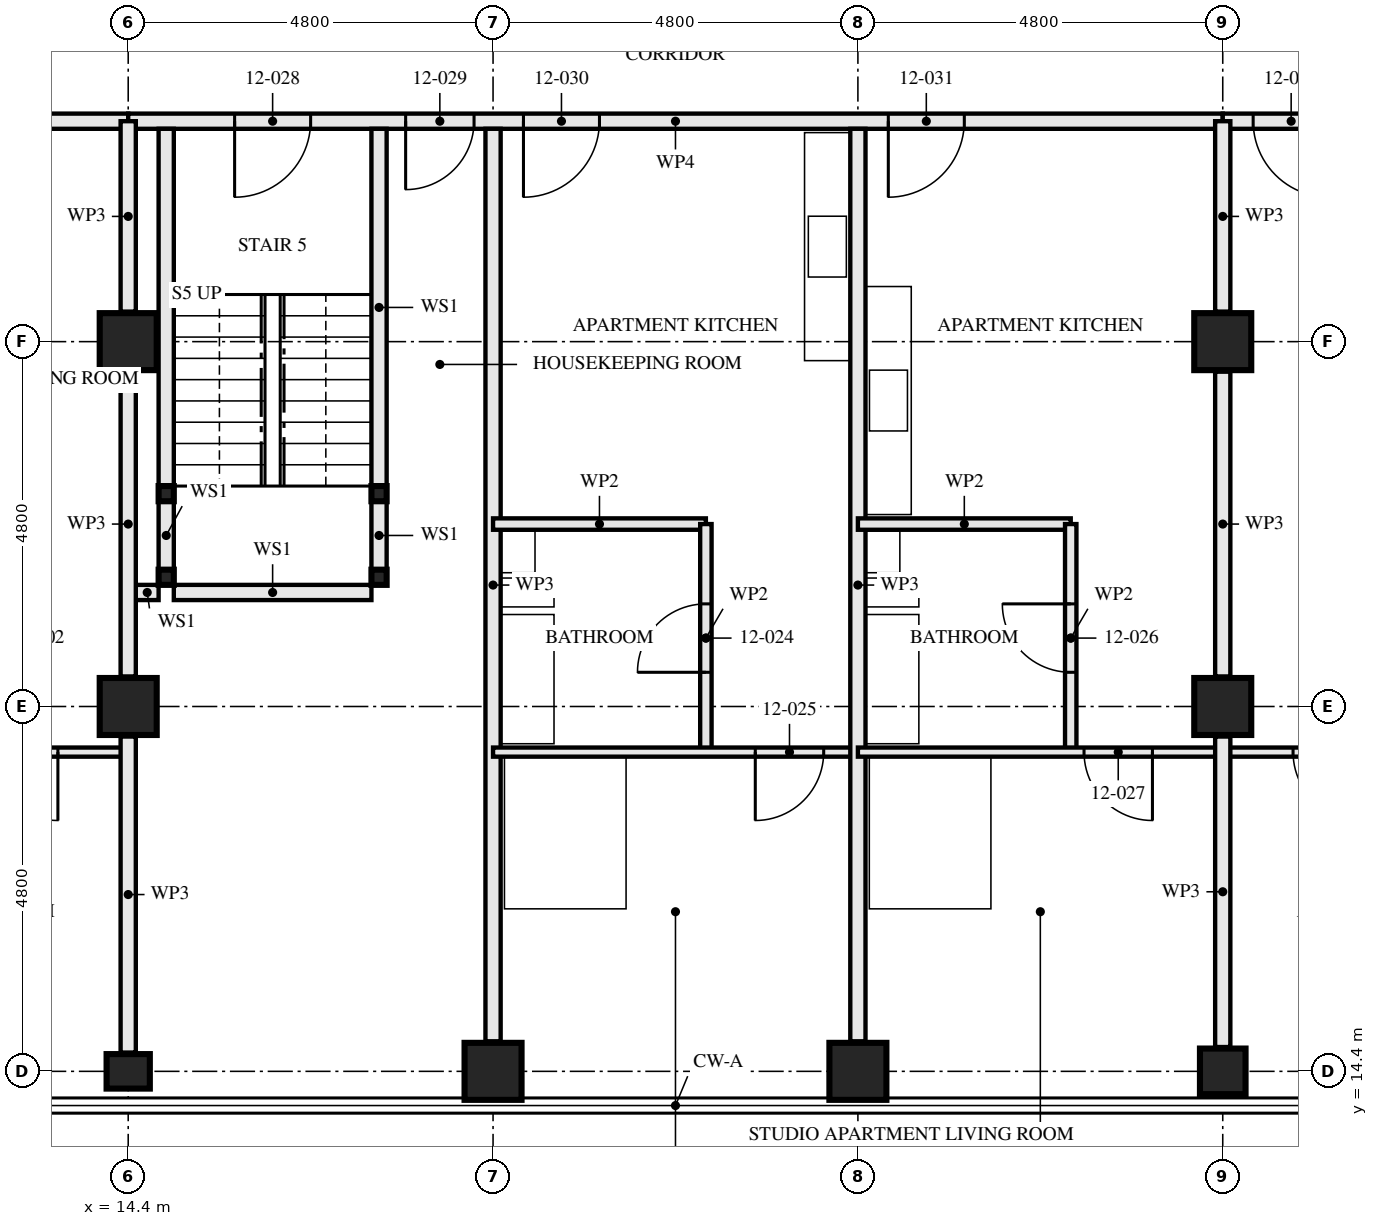
"""IFC4 building model, lengths in metres.
Left out: names, types, materials, properties, quantities, classifications, styles, units other than length and angle.
Written with IfcOpenShell. Run it as: python <this file> out.ifc"""

import sys

from ifc_helpers import new_model, si_unit, direction, frame, frame_2d, origin, origin_2d, place, context, subcontext, project, spatial, rectangle, hollow_rectangle, i_section, extrude, element, fill, save


model = new_model("IFC4")
c1 = context("Model", 3, precision=1e-05, world=origin(), true_north=direction((0.0, 1.0)))
c2 = subcontext(c1, "Body", "Model", "MODEL_VIEW")
j1 = project(units=[si_unit("LENGTHUNIT", "METRE"), si_unit("PLANEANGLEUNIT", "RADIAN")], contexts=[c1])
p1 = place(None, origin())
s1 = spatial("IfcSite", under=j1, at=p1, CompositionType="ELEMENT")
p2 = place(p1, origin())
s2 = spatial("IfcBuilding", under=s1, at=p2, CompositionType="ELEMENT")
p3 = place(p2, frame((0.0, 0.0, 48.0)))
s3 = spatial("IfcBuildingStorey", under=s2, at=p3, CompositionType="ELEMENT", Elevation=48.0)
p4 = place(p3, frame((14.4, 14.4, 0.0), z_axis=(0.0, 0.0, 1.0), x_axis=(0.0, 1.0, 0.0)))
e1 = element("IfcColumn", 1, at=p4, inside=s3, PredefinedType="COLUMN", context=c2, shape_type="SweptSolid", body=[
    extrude(i_section(OverallWidth=0.454, OverallDepth=0.569, WebThickness=0.078, FlangeThickness=0.125, FilletRadius=0.015, at=origin_2d()), origin(), (0.0, 0.0, 1.0), 3.5),
])
for number, where, z_axis, x_axis in (
    (2, (14.4, 19.2, 0.0), (0.0, 0.0, 1.0), (1.0, 0.0, 0.0)),
    (3, (14.4, 24.0, 0.0), (0.0, 0.0, 1.0), (1.0, 0.0, 0.0)),
    (4, (19.2, 14.4, 0.0), (0.0, 0.0, 1.0), (0.0, 1.0, 0.0)),
    (5, (24.0, 14.4, 0.0), (0.0, 0.0, 1.0), (0.0, 1.0, 0.0)),
):
    element("IfcColumn", number, at=place(p3, frame(where, z_axis=z_axis, x_axis=x_axis)), inside=s3, PredefinedType="COLUMN", context=c2, shape_type="SweptSolid", body=[
        extrude(hollow_rectangle(XDim=0.75, YDim=0.75, WallThickness=0.08, at=origin_2d()), origin(), (0.0, 0.0, 1.0), 3.5),
    ])
p5 = place(p3, frame((28.8, 14.4, 0.0), z_axis=(0.0, 0.0, 1.0), x_axis=(0.0, 1.0, 0.0)))
e6 = element("IfcColumn", 6, at=p5, inside=s3, PredefinedType="COLUMN", context=c2, shape_type="SweptSolid", body=[
    extrude(hollow_rectangle(XDim=0.6, YDim=0.6, WallThickness=0.08, at=origin_2d()), origin(), (0.0, 0.0, 1.0), 3.5),
])
for number, where, z_axis, x_axis in (
    (7, (28.8, 19.2, 0.0), (0.0, 0.0, 1.0), (1.0, 0.0, 0.0)),
    (8, (28.8, 24.0, 0.0), (0.0, 0.0, 1.0), (1.0, 0.0, 0.0)),
):
    element("IfcColumn", number, at=place(p3, frame(where, z_axis=z_axis, x_axis=x_axis)), inside=s3, PredefinedType="COLUMN", context=c2, shape_type="SweptSolid", body=[
        extrude(hollow_rectangle(XDim=0.75, YDim=0.75, WallThickness=0.08, at=origin_2d()), origin(), (0.0, 0.0, 1.0), 3.5),
    ])
for number, where, z_axis, x_axis in (
    (9, (14.9, 20.9, 0.0), (0.0, 0.0, 1.0), (1.0, 0.0, 0.0)),
    (10, (17.7, 20.9, 0.0), (0.0, 0.0, 1.0), (1.0, 0.0, 0.0)),
    (11, (14.9, 22.0, 0.0), (0.0, 0.0, 1.0), (1.0, 0.0, 0.0)),
    (12, (17.7, 22.0, 0.0), (0.0, 0.0, 1.0), (1.0, 0.0, 0.0)),
):
    element("IfcColumn", number, at=place(p3, frame(where, z_axis=z_axis, x_axis=x_axis)), inside=s3, PredefinedType="COLUMN", context=c2, shape_type="SweptSolid", body=[
        extrude(hollow_rectangle(XDim=0.2, YDim=0.2, WallThickness=0.008, at=origin_2d()), origin(), (0.0, 0.0, 1.0), 3.33),
    ])
p6 = place(p3, frame((9.6, 18.6, 0.0), z_axis=(0.0, 0.0, 1.0), x_axis=(1.0, 0.0, 0.0)))
e13 = element("IfcWall", 13, at=p6, inside=s3, PredefinedType="PARTITIONING", context=c2, shape_type="SweptSolid", body=[
    extrude(rectangle(XDim=4.8, YDim=0.12, at=frame_2d((2.4, 0.0))), origin(), (0.0, 0.0, 1.0), 3.33),
])
p7 = place(p6, frame((2.975, 0.0, 0.0)))
e14 = element("IfcOpeningElement", 14, at=p7, cuts=e13, PredefinedType="OPENING", context=c2, shape_type="SweptSolid", body=[
    extrude(rectangle(XDim=0.9, YDim=2.1, at=frame_2d((0.45, 1.05))), frame((0.0, 0.071, 0.0), z_axis=(0.0, -1.0, 0.0), x_axis=(1.0, 0.0, 0.0)), (0.0, 0.0, 1.0), 0.141),
])
p8 = place(p3, frame((4.8, 26.9, 0.0), z_axis=(0.0, 0.0, 1.0), x_axis=(1.0, 0.0, 0.0)))
e15 = element("IfcWall", 15, at=p8, inside=s3, PredefinedType="PARTITIONING", context=c2, shape_type="SweptSolid", body=[
    extrude(rectangle(XDim=9.6, YDim=0.2, at=frame_2d((4.8, 0.0))), origin(), (0.0, 0.0, 1.0), 3.33),
])
p9 = place(p8, frame((0.4, 0.0, 0.0)))
e16 = element("IfcOpeningElement", 16, at=p9, cuts=e15, PredefinedType="OPENING", context=c2, shape_type="SweptSolid", body=[
    extrude(rectangle(XDim=1.0, YDim=2.1, at=frame_2d((0.5, 1.05))), frame((0.0, 0.111, 0.0), z_axis=(0.0, -1.0, 0.0), x_axis=(1.0, 0.0, 0.0)), (0.0, 0.0, 1.0), 0.221),
])
p10 = place(p3, frame((14.9, 21.0, 0.0), z_axis=(0.0, 0.0, 1.0), x_axis=(0.0, 1.0, 0.0)))
e17 = element("IfcWall", 17, at=p10, inside=s3, PredefinedType="SOLIDWALL", context=c2, shape_type="SweptSolid", body=[
    extrude(rectangle(XDim=0.9, YDim=0.2, at=frame_2d((0.45, 0.0))), origin(), (0.0, 0.0, 1.0), 2.99),
])
p11 = place(p3, frame((14.9, 22.1, 0.0), z_axis=(0.0, 0.0, 1.0), x_axis=(0.0, 1.0, 0.0)))
e18 = element("IfcWall", 18, at=p11, inside=s3, PredefinedType="SOLIDWALL", context=c2, shape_type="SweptSolid", body=[
    extrude(rectangle(XDim=4.7, YDim=0.2, at=frame_2d((2.35, 0.0))), origin(), (0.0, 0.0, 1.0), 2.99),
])
p12 = place(p3, frame((17.7, 21.0, 0.0), z_axis=(0.0, 0.0, 1.0), x_axis=(0.0, 1.0, 0.0)))
e19 = element("IfcWall", 19, at=p12, inside=s3, PredefinedType="SOLIDWALL", context=c2, shape_type="SweptSolid", body=[
    extrude(rectangle(XDim=0.9, YDim=0.2, at=frame_2d((0.45, 0.0))), origin(), (0.0, 0.0, 1.0), 2.99),
])
p13 = place(p3, frame((17.7, 22.1, 0.0), z_axis=(0.0, 0.0, 1.0), x_axis=(0.0, 1.0, 0.0)))
e20 = element("IfcWall", 20, at=p13, inside=s3, PredefinedType="SOLIDWALL", context=c2, shape_type="SweptSolid", body=[
    extrude(rectangle(XDim=4.7, YDim=0.2, at=frame_2d((2.35, 0.0))), origin(), (0.0, 0.0, 1.0), 2.99),
])
p14 = place(p3, frame((14.5, 20.7, 0.0), z_axis=(0.0, 0.0, 1.0), x_axis=(1.0, 0.0, 0.0)))
e21 = element("IfcWall", 21, at=p14, inside=s3, PredefinedType="SOLIDWALL", context=c2, shape_type="SweptSolid", body=[
    extrude(rectangle(XDim=0.3, YDim=0.2, at=frame_2d((0.15, 0.0))), origin(), (0.0, 0.0, 1.0), 3.33),
])
p15 = place(p3, frame((15.0, 20.7, 0.0), z_axis=(0.0, 0.0, 1.0), x_axis=(1.0, 0.0, 0.0)))
e22 = element("IfcWall", 22, at=p15, inside=s3, PredefinedType="SOLIDWALL", context=c2, shape_type="SweptSolid", body=[
    extrude(rectangle(XDim=2.6, YDim=0.2, at=frame_2d((1.3, 0.0))), origin(), (0.0, 0.0, 1.0), 3.33),
])
p16 = place(p3, frame((19.2, 14.795, 0.0), z_axis=(0.0, 0.0, 1.0), x_axis=(0.0, 1.0, 0.0)))
e23 = element("IfcWall", 23, at=p16, inside=s3, PredefinedType="PARTITIONING", context=c2, shape_type="SweptSolid", body=[
    extrude(rectangle(XDim=12.005, YDim=0.2, at=frame_2d((6.002, 0.0))), origin(), (0.0, 0.0, 1.0), 2.55),
])
p17 = place(p3, frame((22.0, 18.6, 0.0), z_axis=(0.0, 0.0, 1.0), x_axis=(0.0, 1.0, 0.0)))
e24 = element("IfcWall", 24, at=p17, inside=s3, PredefinedType="PARTITIONING", context=c2, shape_type="SweptSolid", body=[
    extrude(rectangle(XDim=3.0, YDim=0.15, at=frame_2d((1.5, 0.0))), origin(), (0.0, 0.0, 1.0), 2.55),
])
p18 = place(p17, frame((1.05, 0.0, 0.0)))
e25 = element("IfcOpeningElement", 25, at=p18, cuts=e24, PredefinedType="OPENING", context=c2, shape_type="SweptSolid", body=[
    extrude(rectangle(XDim=0.9, YDim=2.1, at=frame_2d((0.45, 1.05))), frame((0.0, 0.085, 0.0), z_axis=(0.0, -1.0, 0.0), x_axis=(1.0, 0.0, 0.0)), (0.0, 0.0, 1.0), 0.171),
])
p19 = place(p3, frame((19.2, 21.6, 0.0), z_axis=(0.0, 0.0, 1.0), x_axis=(1.0, 0.0, 0.0)))
e26 = element("IfcWall", 26, at=p19, inside=s3, PredefinedType="PARTITIONING", context=c2, shape_type="SweptSolid", body=[
    extrude(rectangle(XDim=2.8, YDim=0.15, at=frame_2d((1.4, 0.0))), origin(), (0.0, 0.0, 1.0), 3.33),
])
p20 = place(p3, frame((19.2, 18.6, 0.0), z_axis=(0.0, 0.0, 1.0), x_axis=(1.0, 0.0, 0.0)))
e27 = element("IfcWall", 27, at=p20, inside=s3, PredefinedType="PARTITIONING", context=c2, shape_type="SweptSolid", body=[
    extrude(rectangle(XDim=4.8, YDim=0.12, at=frame_2d((2.4, 0.0))), origin(), (0.0, 0.0, 1.0), 3.33),
])
p21 = place(p20, frame((3.45, 0.0, 0.0)))
e28 = element("IfcOpeningElement", 28, at=p21, cuts=e27, PredefinedType="OPENING", context=c2, shape_type="SweptSolid", body=[
    extrude(rectangle(XDim=0.9, YDim=2.1, at=frame_2d((0.45, 1.05))), frame((0.0, 0.071, 0.0), z_axis=(0.0, -1.0, 0.0), x_axis=(1.0, 0.0, 0.0)), (0.0, 0.0, 1.0), 0.141),
])
p22 = place(p3, frame((24.0, 14.795, 0.0), z_axis=(0.0, 0.0, 1.0), x_axis=(0.0, 1.0, 0.0)))
e29 = element("IfcWall", 29, at=p22, inside=s3, PredefinedType="PARTITIONING", context=c2, shape_type="SweptSolid", body=[
    extrude(rectangle(XDim=12.005, YDim=0.2, at=frame_2d((6.002, 0.0))), origin(), (0.0, 0.0, 1.0), 2.55),
])
p23 = place(p3, frame((26.8, 18.6, 0.0), z_axis=(0.0, 0.0, 1.0), x_axis=(0.0, 1.0, 0.0)))
e30 = element("IfcWall", 30, at=p23, inside=s3, PredefinedType="PARTITIONING", context=c2, shape_type="SweptSolid", body=[
    extrude(rectangle(XDim=3.0, YDim=0.15, at=frame_2d((1.5, 0.0))), origin(), (0.0, 0.0, 1.0), 2.55),
])
p24 = place(p23, frame((1.05, 0.0, 0.0)))
e31 = element("IfcOpeningElement", 31, at=p24, cuts=e30, PredefinedType="OPENING", context=c2, shape_type="SweptSolid", body=[
    extrude(rectangle(XDim=0.9, YDim=2.1, at=frame_2d((0.45, 1.05))), frame((0.0, 0.085, 0.0), z_axis=(0.0, -1.0, 0.0), x_axis=(1.0, 0.0, 0.0)), (0.0, 0.0, 1.0), 0.171),
])
p25 = place(p3, frame((24.0, 21.6, 0.0), z_axis=(0.0, 0.0, 1.0), x_axis=(1.0, 0.0, 0.0)))
e32 = element("IfcWall", 32, at=p25, inside=s3, PredefinedType="PARTITIONING", context=c2, shape_type="SweptSolid", body=[
    extrude(rectangle(XDim=2.8, YDim=0.15, at=frame_2d((1.4, 0.0))), origin(), (0.0, 0.0, 1.0), 3.33),
])
p26 = place(p3, frame((24.0, 18.6, 0.0), z_axis=(0.0, 0.0, 1.0), x_axis=(1.0, 0.0, 0.0)))
e33 = element("IfcWall", 33, at=p26, inside=s3, PredefinedType="PARTITIONING", context=c2, shape_type="SweptSolid", body=[
    extrude(rectangle(XDim=4.8, YDim=0.12, at=frame_2d((2.4, 0.0))), origin(), (0.0, 0.0, 1.0), 3.33),
])
p27 = place(p26, frame((2.975, 0.0, 0.0)))
e34 = element("IfcOpeningElement", 34, at=p27, cuts=e33, PredefinedType="OPENING", context=c2, shape_type="SweptSolid", body=[
    extrude(rectangle(XDim=0.9, YDim=2.1, at=frame_2d((0.45, 1.05))), frame((0.0, 0.071, 0.0), z_axis=(0.0, -1.0, 0.0), x_axis=(1.0, 0.0, 0.0)), (0.0, 0.0, 1.0), 0.141),
])
p28 = place(p3, frame((14.4, 26.9, 0.0), z_axis=(0.0, 0.0, 1.0), x_axis=(1.0, 0.0, 0.0)))
e35 = element("IfcWall", 35, at=p28, inside=s3, PredefinedType="PARTITIONING", context=c2, shape_type="SweptSolid", body=[
    extrude(rectangle(XDim=14.4, YDim=0.2, at=frame_2d((7.2, 0.0))), origin(), (0.0, 0.0, 1.0), 2.55),
])
p29 = place(p28, frame((1.4, 0.0, 0.0)))
e36 = element("IfcOpeningElement", 36, at=p29, cuts=e35, PredefinedType="OPENING", context=c2, shape_type="SweptSolid", body=[
    extrude(rectangle(XDim=1.0, YDim=2.1, at=frame_2d((0.5, 1.05))), frame((0.0, 0.111, 0.0), z_axis=(0.0, -1.0, 0.0), x_axis=(1.0, 0.0, 0.0)), (0.0, 0.0, 1.0), 0.221),
])
p30 = place(p28, frame((3.65, 0.0, 0.0)))
e37 = element("IfcOpeningElement", 37, at=p30, cuts=e35, PredefinedType="OPENING", context=c2, shape_type="SweptSolid", body=[
    extrude(rectangle(XDim=0.9, YDim=2.1, at=frame_2d((0.45, 1.05))), frame((0.0, 0.111, 0.0), z_axis=(0.0, -1.0, 0.0), x_axis=(1.0, 0.0, 0.0)), (0.0, 0.0, 1.0), 0.221),
])
p31 = place(p28, frame((5.2, 0.0, 0.0)))
e38 = element("IfcOpeningElement", 38, at=p31, cuts=e35, PredefinedType="OPENING", context=c2, shape_type="SweptSolid", body=[
    extrude(rectangle(XDim=1.0, YDim=2.1, at=frame_2d((0.5, 1.05))), frame((0.0, 0.111, 0.0), z_axis=(0.0, -1.0, 0.0), x_axis=(1.0, 0.0, 0.0)), (0.0, 0.0, 1.0), 0.221),
])
p32 = place(p28, frame((10.0, 0.0, 0.0)))
e39 = element("IfcOpeningElement", 39, at=p32, cuts=e35, PredefinedType="OPENING", context=c2, shape_type="SweptSolid", body=[
    extrude(rectangle(XDim=1.0, YDim=2.1, at=frame_2d((0.5, 1.05))), frame((0.0, 0.111, 0.0), z_axis=(0.0, -1.0, 0.0), x_axis=(1.0, 0.0, 0.0)), (0.0, 0.0, 1.0), 0.221),
])
p33 = place(p3, frame((28.8, 18.6, 0.0), z_axis=(0.0, 0.0, 1.0), x_axis=(1.0, 0.0, 0.0)))
e40 = element("IfcWall", 40, at=p33, inside=s3, PredefinedType="PARTITIONING", context=c2, shape_type="SweptSolid", body=[
    extrude(rectangle(XDim=4.8, YDim=0.12, at=frame_2d((2.4, 0.0))), origin(), (0.0, 0.0, 1.0), 3.33),
])
p34 = place(p33, frame((0.925, 0.0, 0.0)))
e41 = element("IfcOpeningElement", 41, at=p34, cuts=e40, PredefinedType="OPENING", context=c2, shape_type="SweptSolid", body=[
    extrude(rectangle(XDim=0.9, YDim=2.1, at=frame_2d((0.45, 1.05))), frame((0.0, 0.071, 0.0), z_axis=(0.0, -1.0, 0.0), x_axis=(1.0, 0.0, 0.0)), (0.0, 0.0, 1.0), 0.141),
])
p35 = place(p3, frame((28.8, 26.9, 0.0), z_axis=(0.0, 0.0, 1.0), x_axis=(1.0, 0.0, 0.0)))
e42 = element("IfcWall", 42, at=p35, inside=s3, PredefinedType="PARTITIONING", context=c2, shape_type="SweptSolid", body=[
    extrude(rectangle(XDim=9.6, YDim=0.2, at=frame_2d((4.8, 0.0))), origin(), (0.0, 0.0, 1.0), 3.33),
])
p36 = place(p35, frame((0.4, 0.0, 0.0)))
e43 = element("IfcOpeningElement", 43, at=p36, cuts=e42, PredefinedType="OPENING", context=c2, shape_type="SweptSolid", body=[
    extrude(rectangle(XDim=1.0, YDim=2.1, at=frame_2d((0.5, 1.05))), frame((0.0, 0.111, 0.0), z_axis=(0.0, -1.0, 0.0), x_axis=(1.0, 0.0, 0.0)), (0.0, 0.0, 1.0), 0.221),
])
p37 = place(p3, frame((14.4, 14.647, 0.0), z_axis=(0.0, 0.0, 1.0), x_axis=(0.0, 1.0, 0.0)))
e44 = element("IfcWall", 44, at=p37, inside=s3, PredefinedType="PARTITIONING", context=c2, shape_type="SweptSolid", body=[
    extrude(rectangle(XDim=4.158, YDim=0.2, at=frame_2d((2.079, 0.0))), origin(), (0.0, 0.0, 1.0), 2.32),
])
p38 = place(p3, frame((14.4, 19.595, 0.0), z_axis=(0.0, 0.0, 1.0), x_axis=(0.0, 1.0, 0.0)))
e45 = element("IfcWall", 45, at=p38, inside=s3, PredefinedType="PARTITIONING", context=c2, shape_type="SweptSolid", body=[
    extrude(rectangle(XDim=4.01, YDim=0.2, at=frame_2d((2.005, 0.0))), origin(), (0.0, 0.0, 1.0), 2.32),
])
p39 = place(p3, frame((14.4, 24.395, 0.0), z_axis=(0.0, 0.0, 1.0), x_axis=(0.0, 1.0, 0.0)))
e46 = element("IfcWall", 46, at=p39, inside=s3, PredefinedType="PARTITIONING", context=c2, shape_type="SweptSolid", body=[
    extrude(rectangle(XDim=2.505, YDim=0.2, at=frame_2d((1.252, 0.0))), origin(), (0.0, 0.0, 1.0), 2.32),
])
p40 = place(p3, frame((28.8, 14.72, 0.0), z_axis=(0.0, 0.0, 1.0), x_axis=(0.0, 1.0, 0.0)))
e47 = element("IfcWall", 47, at=p40, inside=s3, PredefinedType="PARTITIONING", context=c2, shape_type="SweptSolid", body=[
    extrude(rectangle(XDim=4.085, YDim=0.2, at=frame_2d((2.042, 0.0))), origin(), (0.0, 0.0, 1.0), 2.32),
])
p41 = place(p3, frame((28.8, 19.595, 0.0), z_axis=(0.0, 0.0, 1.0), x_axis=(0.0, 1.0, 0.0)))
e48 = element("IfcWall", 48, at=p41, inside=s3, PredefinedType="PARTITIONING", context=c2, shape_type="SweptSolid", body=[
    extrude(rectangle(XDim=4.01, YDim=0.2, at=frame_2d((2.005, 0.0))), origin(), (0.0, 0.0, 1.0), 2.32),
])
p42 = place(p3, frame((28.8, 24.395, 0.0), z_axis=(0.0, 0.0, 1.0), x_axis=(0.0, 1.0, 0.0)))
e49 = element("IfcWall", 49, at=p42, inside=s3, PredefinedType="PARTITIONING", context=c2, shape_type="SweptSolid", body=[
    extrude(rectangle(XDim=2.505, YDim=0.2, at=frame_2d((1.252, 0.0))), origin(), (0.0, 0.0, 1.0), 2.32),
])
p43 = place(p7, frame((0.9, 0.0, 0.0), z_axis=(0.0, 0.0, 1.0), x_axis=(-1.0, 0.0, 0.0)))
e50 = element("IfcDoor", 50, at=p43, inside=s3, OperationType="SINGLE_SWING_RIGHT", PredefinedType="DOOR", context=c2, shape_type="SweptSolid", body=[
    extrude(rectangle(XDim=0.9, YDim=2.1, at=frame_2d((0.45, 1.05))), frame((0.0, 0.022, 0.0), z_axis=(0.0, -1.0, 0.0), x_axis=(1.0, 0.0, 0.0)), (0.0, 0.0, 1.0), 0.044),
])
fill(e14, e50)
p44 = place(p18, origin())
e51 = element("IfcDoor", 51, at=p44, inside=s3, OperationType="SINGLE_SWING_RIGHT", PredefinedType="DOOR", context=c2, shape_type="SweptSolid", body=[
    extrude(rectangle(XDim=0.9, YDim=2.1, at=frame_2d((0.45, 1.05))), frame((0.0, 0.022, 0.0), z_axis=(0.0, -1.0, 0.0), x_axis=(1.0, 0.0, 0.0)), (0.0, 0.0, 1.0), 0.044),
])
fill(e25, e51)
p45 = place(p21, frame((0.9, 0.0, 0.0), z_axis=(0.0, 0.0, 1.0), x_axis=(-1.0, 0.0, 0.0)))
e52 = element("IfcDoor", 52, at=p45, inside=s3, OperationType="SINGLE_SWING_LEFT", PredefinedType="DOOR", context=c2, shape_type="SweptSolid", body=[
    extrude(rectangle(XDim=0.9, YDim=2.1, at=frame_2d((0.45, 1.05))), frame((0.0, 0.022, 0.0), z_axis=(0.0, -1.0, 0.0), x_axis=(1.0, 0.0, 0.0)), (0.0, 0.0, 1.0), 0.044),
])
fill(e28, e52)
p46 = place(p24, origin())
e53 = element("IfcDoor", 53, at=p46, inside=s3, OperationType="SINGLE_SWING_LEFT", PredefinedType="DOOR", context=c2, shape_type="SweptSolid", body=[
    extrude(rectangle(XDim=0.9, YDim=2.1, at=frame_2d((0.45, 1.05))), frame((0.0, 0.022, 0.0), z_axis=(0.0, -1.0, 0.0), x_axis=(1.0, 0.0, 0.0)), (0.0, 0.0, 1.0), 0.044),
])
fill(e31, e53)
p47 = place(p27, frame((0.9, 0.0, 0.0), z_axis=(0.0, 0.0, 1.0), x_axis=(-1.0, 0.0, 0.0)))
e54 = element("IfcDoor", 54, at=p47, inside=s3, OperationType="SINGLE_SWING_RIGHT", PredefinedType="DOOR", context=c2, shape_type="SweptSolid", body=[
    extrude(rectangle(XDim=0.9, YDim=2.1, at=frame_2d((0.45, 1.05))), frame((0.0, 0.022, 0.0), z_axis=(0.0, -1.0, 0.0), x_axis=(1.0, 0.0, 0.0)), (0.0, 0.0, 1.0), 0.044),
])
fill(e34, e54)
p48 = place(p29, frame((1.0, 0.0, 0.0), z_axis=(0.0, 0.0, 1.0), x_axis=(-1.0, 0.0, 0.0)))
e55 = element("IfcDoor", 55, at=p48, inside=s3, OperationType="SINGLE_SWING_LEFT", PredefinedType="DOOR", context=c2, shape_type="SweptSolid", body=[
    extrude(rectangle(XDim=1.0, YDim=2.1, at=frame_2d((0.5, 1.05))), frame((0.0, 0.032, 0.0), z_axis=(0.0, -1.0, 0.0), x_axis=(1.0, 0.0, 0.0)), (0.0, 0.0, 1.0), 0.064),
])
fill(e36, e55)
p49 = place(p30, frame((0.9, 0.0, 0.0), z_axis=(0.0, 0.0, 1.0), x_axis=(-1.0, 0.0, 0.0)))
e56 = element("IfcDoor", 56, at=p49, inside=s3, OperationType="SINGLE_SWING_LEFT", PredefinedType="DOOR", context=c2, shape_type="SweptSolid", body=[
    extrude(rectangle(XDim=0.9, YDim=2.1, at=frame_2d((0.45, 1.05))), frame((0.0, 0.027, 0.0), z_axis=(0.0, -1.0, 0.0), x_axis=(1.0, 0.0, 0.0)), (0.0, 0.0, 1.0), 0.054),
])
fill(e37, e56)
p50 = place(p31, frame((1.0, 0.0, 0.0), z_axis=(0.0, 0.0, 1.0), x_axis=(-1.0, 0.0, 0.0)))
e57 = element("IfcDoor", 57, at=p50, inside=s3, OperationType="SINGLE_SWING_LEFT", PredefinedType="DOOR", context=c2, shape_type="SweptSolid", body=[
    extrude(rectangle(XDim=1.0, YDim=2.1, at=frame_2d((0.5, 1.05))), frame((0.0, 0.027, 0.0), z_axis=(0.0, -1.0, 0.0), x_axis=(1.0, 0.0, 0.0)), (0.0, 0.0, 1.0), 0.054),
])
fill(e38, e57)
p51 = place(p32, frame((1.0, 0.0, 0.0), z_axis=(0.0, 0.0, 1.0), x_axis=(-1.0, 0.0, 0.0)))
e58 = element("IfcDoor", 58, at=p51, inside=s3, OperationType="SINGLE_SWING_LEFT", PredefinedType="DOOR", context=c2, shape_type="SweptSolid", body=[
    extrude(rectangle(XDim=1.0, YDim=2.1, at=frame_2d((0.5, 1.05))), frame((0.0, 0.027, 0.0), z_axis=(0.0, -1.0, 0.0), x_axis=(1.0, 0.0, 0.0)), (0.0, 0.0, 1.0), 0.054),
])
fill(e39, e58)
p52 = place(p34, frame((0.9, 0.0, 0.0), z_axis=(0.0, 0.0, 1.0), x_axis=(-1.0, 0.0, 0.0)))
e59 = element("IfcDoor", 59, at=p52, inside=s3, OperationType="SINGLE_SWING_RIGHT", PredefinedType="DOOR", context=c2, shape_type="SweptSolid", body=[
    extrude(rectangle(XDim=0.9, YDim=2.1, at=frame_2d((0.45, 1.05))), frame((0.0, 0.022, 0.0), z_axis=(0.0, -1.0, 0.0), x_axis=(1.0, 0.0, 0.0)), (0.0, 0.0, 1.0), 0.044),
])
fill(e41, e59)
p53 = place(p36, frame((1.0, 0.0, 0.0), z_axis=(0.0, 0.0, 1.0), x_axis=(-1.0, 0.0, 0.0)))
e60 = element("IfcDoor", 60, at=p53, inside=s3, OperationType="SINGLE_SWING_RIGHT", PredefinedType="DOOR", context=c2, shape_type="SweptSolid", body=[
    extrude(rectangle(XDim=1.0, YDim=2.1, at=frame_2d((0.5, 1.05))), frame((0.0, 0.027, 0.0), z_axis=(0.0, -1.0, 0.0), x_axis=(1.0, 0.0, 0.0)), (0.0, 0.0, 1.0), 0.054),
])
fill(e43, e60)
save(model, sys.argv[1])
